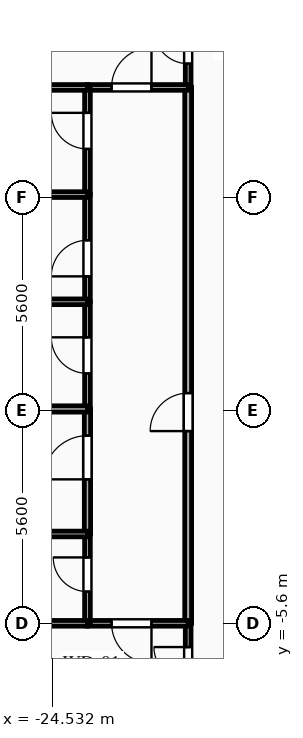
"""IFC4 building model, lengths in metres.
Left out: names, types, materials, properties, quantities, classifications, styles, units other than length and angle.
Written with IfcOpenShell. Run it as: python <this file> out.ifc"""

import sys

from ifc_helpers import new_model, si_unit, direction, frame, frame_2d, origin, place, context, subcontext, project, spatial, rectangle, extrude, element, fill, save


model = new_model("IFC4")
c1 = context("Model", 3, precision=1e-05, world=origin(), true_north=direction((0.0, 1.0)))
c2 = subcontext(c1, "Body", "Model", "MODEL_VIEW")
j1 = project(units=[si_unit("LENGTHUNIT", "METRE"), si_unit("PLANEANGLEUNIT", "RADIAN")], contexts=[c1])
p1 = place(None, origin())
s1 = spatial("IfcSite", under=j1, at=p1, CompositionType="ELEMENT")
p2 = place(p1, origin())
s2 = spatial("IfcBuilding", under=s1, at=p2, CompositionType="ELEMENT")
p3 = place(p2, frame((0.0, 0.0, 137.7)))
s3 = spatial("IfcBuildingStorey", under=s2, at=p3, CompositionType="ELEMENT", Elevation=137.7)
p4 = place(p3, frame((-20.95, 8.5, 0.0), z_axis=(0.0, 0.0, 1.0), x_axis=(0.0, 1.0, 0.0)))
e1 = element("IfcWall", 1, at=p4, inside=s3, PredefinedType="PARTITIONING", context=c2, shape_type="SweptSolid", body=[
    extrude(rectangle(XDim=2.15, YDim=0.15, at=frame_2d((1.075, 0.0))), origin(), (0.0, 0.0, 1.0), 3.04),
])
p5 = place(p4, frame((0.625, 0.0, 0.0)))
e2 = element("IfcOpeningElement", 2, at=p5, cuts=e1, PredefinedType="OPENING", context=c2, shape_type="SweptSolid", body=[
    extrude(rectangle(XDim=0.9, YDim=2.1, at=frame_2d((0.45, 1.05))), frame((0.0, 0.085, 0.0), z_axis=(0.0, -1.0, 0.0), x_axis=(1.0, 0.0, 0.0)), (0.0, 0.0, 1.0), 0.17),
])
p6 = place(p3, frame((-20.95, -7.75, 0.0), z_axis=(0.0, 0.0, 1.0), x_axis=(0.0, 1.0, 0.0)))
e3 = element("IfcWall", 3, at=p6, inside=s3, PredefinedType="PARTITIONING", context=c2, shape_type="SweptSolid", body=[
    extrude(rectangle(XDim=2.15, YDim=0.15, at=frame_2d((1.075, 0.0))), origin(), (0.0, 0.0, 1.0), 3.04),
])
p7 = place(p6, frame((0.625, 0.0, 0.0)))
e4 = element("IfcOpeningElement", 4, at=p7, cuts=e3, PredefinedType="OPENING", context=c2, shape_type="SweptSolid", body=[
    extrude(rectangle(XDim=0.9, YDim=2.1, at=frame_2d((0.45, 1.05))), frame((0.0, 0.085, 0.0), z_axis=(0.0, -1.0, 0.0), x_axis=(1.0, 0.0, 0.0)), (0.0, 0.0, 1.0), 0.17),
])
p8 = place(p3, frame((-20.95, -5.6, 0.0), z_axis=(0.0, 0.0, 1.0), x_axis=(0.0, 1.0, 0.0)))
e5 = element("IfcWall", 5, at=p8, inside=s3, PredefinedType="PARTITIONING", context=c2, shape_type="SweptSolid", body=[
    extrude(rectangle(XDim=14.1, YDim=0.18, at=frame_2d((7.05, 0.0))), origin(), (0.0, 0.0, 1.0), 3.04),
])
p9 = place(p8, frame((5.058, 0.0, 0.0)))
e6 = element("IfcOpeningElement", 6, at=p9, cuts=e5, PredefinedType="OPENING", context=c2, shape_type="SweptSolid", body=[
    extrude(rectangle(XDim=1.0, YDim=2.15, at=frame_2d((0.5, 1.075))), frame((0.0, 0.1, 0.0), z_axis=(0.0, -1.0, 0.0), x_axis=(1.0, 0.0, 0.0)), (0.0, 0.0, 1.0), 0.2),
])
p10 = place(p3, frame((-23.6, 8.5, 0.0), z_axis=(0.0, 0.0, 1.0), x_axis=(1.0, 0.0, 0.0)))
e7 = element("IfcWall", 7, at=p10, inside=s3, PredefinedType="PARTITIONING", context=c2, shape_type="SweptSolid", body=[
    extrude(rectangle(XDim=2.65, YDim=0.15, at=frame_2d((1.325, 0.0))), origin(), (0.0, 0.0, 1.0), 3.04),
])
p11 = place(p10, frame((0.635, 0.0, 0.0)))
e8 = element("IfcOpeningElement", 8, at=p11, cuts=e7, PredefinedType="OPENING", context=c2, shape_type="SweptSolid", body=[
    extrude(rectangle(XDim=1.05, YDim=2.15, at=frame_2d((0.525, 1.075))), frame((0.0, 0.085, 0.0), z_axis=(0.0, -1.0, 0.0), x_axis=(1.0, 0.0, 0.0)), (0.0, 0.0, 1.0), 0.17),
])
p12 = place(p3, frame((-20.95, -5.6, 0.0), z_axis=(0.0, 0.0, 1.0), x_axis=(-1.0, 0.0, 0.0)))
e9 = element("IfcWall", 9, at=p12, inside=s3, PredefinedType="PARTITIONING", context=c2, shape_type="SweptSolid", body=[
    extrude(rectangle(XDim=2.65, YDim=0.15, at=frame_2d((1.325, 0.0))), origin(), (0.0, 0.0, 1.0), 3.04),
])
p13 = place(p12, frame((0.965, 0.0, 0.0)))
e10 = element("IfcOpeningElement", 10, at=p13, cuts=e9, PredefinedType="OPENING", context=c2, shape_type="SweptSolid", body=[
    extrude(rectangle(XDim=1.05, YDim=2.15, at=frame_2d((0.525, 1.075))), frame((0.0, 0.085, 0.0), z_axis=(0.0, -1.0, 0.0), x_axis=(1.0, 0.0, 0.0)), (0.0, 0.0, 1.0), 0.17),
])
p14 = place(p3, frame((-23.6, -5.6, 0.0), z_axis=(0.0, 0.0, 1.0), x_axis=(0.0, 1.0, 0.0)))
e11 = element("IfcWall", 11, at=p14, inside=s3, PredefinedType="PLUMBINGWALL", context=c2, shape_type="SweptSolid", body=[
    extrude(rectangle(XDim=2.35, YDim=0.15, at=frame_2d((1.175, 0.0))), origin(), (0.0, 0.0, 1.0), 2.695),
])
p15 = place(p14, frame((0.834, 0.0, 0.0)))
e12 = element("IfcOpeningElement", 12, at=p15, cuts=e11, PredefinedType="OPENING", context=c2, shape_type="SweptSolid", body=[
    extrude(rectangle(XDim=0.9, YDim=2.1, at=frame_2d((0.45, 1.05))), frame((0.0, 0.085, 0.0), z_axis=(0.0, -1.0, 0.0), x_axis=(1.0, 0.0, 0.0)), (0.0, 0.0, 1.0), 0.17),
])
p16 = place(p3, frame((-23.6, -3.25, 0.0), z_axis=(0.0, 0.0, 1.0), x_axis=(0.0, 1.0, 0.0)))
e13 = element("IfcWall", 13, at=p16, inside=s3, PredefinedType="PARTITIONING", context=c2, shape_type="SweptSolid", body=[
    extrude(rectangle(XDim=3.29, YDim=0.165, at=frame_2d((1.645, 0.0))), origin(), (0.0, 0.0, 1.0), 2.695),
])
p17 = place(p16, frame((1.438, 0.0, 0.0)))
e14 = element("IfcOpeningElement", 14, at=p17, cuts=e13, PredefinedType="OPENING", context=c2, shape_type="SweptSolid", body=[
    extrude(rectangle(XDim=1.15, YDim=2.15, at=frame_2d((0.575, 1.075))), frame((0.0, 0.093, 0.0), z_axis=(0.0, -1.0, 0.0), x_axis=(1.0, 0.0, 0.0)), (0.0, 0.0, 1.0), 0.185),
])
p18 = place(p3, frame((-23.6, 0.04, 0.0), z_axis=(0.0, 0.0, 1.0), x_axis=(0.0, 1.0, 0.0)))
e15 = element("IfcWall", 15, at=p18, inside=s3, PredefinedType="PARTITIONING", context=c2, shape_type="SweptSolid", body=[
    extrude(rectangle(XDim=2.82, YDim=0.15, at=frame_2d((1.41, 0.0))), origin(), (0.0, 0.0, 1.0), 2.695),
])
p19 = place(p18, frame((0.935, 0.0, 0.0)))
e16 = element("IfcOpeningElement", 16, at=p19, cuts=e15, PredefinedType="OPENING", context=c2, shape_type="SweptSolid", body=[
    extrude(rectangle(XDim=0.95, YDim=2.1, at=frame_2d((0.475, 1.05))), frame((0.0, 0.085, 0.0), z_axis=(0.0, -1.0, 0.0), x_axis=(1.0, 0.0, 0.0)), (0.0, 0.0, 1.0), 0.17),
])
p20 = place(p3, frame((-23.6, 2.86, 0.0), z_axis=(0.0, 0.0, 1.0), x_axis=(0.0, 1.0, 0.0)))
e17 = element("IfcWall", 17, at=p20, inside=s3, PredefinedType="PARTITIONING", context=c2, shape_type="SweptSolid", body=[
    extrude(rectangle(XDim=2.82, YDim=0.15, at=frame_2d((1.41, 0.0))), origin(), (0.0, 0.0, 1.0), 2.695),
])
p21 = place(p20, frame((0.669, 0.0, 0.0)))
e18 = element("IfcOpeningElement", 18, at=p21, cuts=e17, PredefinedType="OPENING", context=c2, shape_type="SweptSolid", body=[
    extrude(rectangle(XDim=0.95, YDim=2.1, at=frame_2d((0.475, 1.05))), frame((0.0, 0.085, 0.0), z_axis=(0.0, -1.0, 0.0), x_axis=(1.0, 0.0, 0.0)), (0.0, 0.0, 1.0), 0.17),
])
p22 = place(p3, frame((-23.6, 5.68, 0.0), z_axis=(0.0, 0.0, 1.0), x_axis=(0.0, 1.0, 0.0)))
e19 = element("IfcWall", 19, at=p22, inside=s3, PredefinedType="PARTITIONING", context=c2, shape_type="SweptSolid", body=[
    extrude(rectangle(XDim=2.82, YDim=0.15, at=frame_2d((1.41, 0.0))), origin(), (0.0, 0.0, 1.0), 2.695),
])
p23 = place(p22, frame((1.201, 0.0, 0.0)))
e20 = element("IfcOpeningElement", 20, at=p23, cuts=e19, PredefinedType="OPENING", context=c2, shape_type="SweptSolid", body=[
    extrude(rectangle(XDim=0.95, YDim=2.1, at=frame_2d((0.475, 1.05))), frame((0.0, 0.085, 0.0), z_axis=(0.0, -1.0, 0.0), x_axis=(1.0, 0.0, 0.0)), (0.0, 0.0, 1.0), 0.17),
])
p24 = place(p3, frame((-23.6, 8.5, 0.0), z_axis=(0.0, 0.0, 1.0), x_axis=(-1.0, 0.0, 0.0)))
e21 = element("IfcWall", 21, at=p24, inside=s3, PredefinedType="PARTITIONING", context=c2, shape_type="SweptSolid", body=[
    extrude(rectangle(XDim=1.165, YDim=0.15, at=frame_2d((0.583, 0.0))), origin(), (0.0, 0.0, 1.0), 3.04),
])
for number, where, z_axis, x_axis in (
    (22, (-29.0, -5.6, 0.0), (0.0, 0.0, 1.0), (1.0, 0.0, 0.0)),
    (23, (-29.0, -3.25, 0.0), (0.0, 0.0, 1.0), (1.0, 0.0, 0.0)),
):
    element("IfcWall", number, at=place(p3, frame(where, z_axis=z_axis, x_axis=x_axis)), inside=s3, PredefinedType="PLUMBINGWALL", context=c2, shape_type="SweptSolid", body=[
        extrude(rectangle(XDim=5.4, YDim=0.15, at=frame_2d((2.7, 0.0))), origin(), (0.0, 0.0, 1.0), 3.04),
    ])
p25 = place(p3, frame((-29.0, 0.04, 0.0), z_axis=(0.0, 0.0, 1.0), x_axis=(1.0, 0.0, 0.0)))
e24 = element("IfcWall", 24, at=p25, inside=s3, PredefinedType="PARTITIONING", context=c2, shape_type="SweptSolid", body=[
    extrude(rectangle(XDim=5.4, YDim=0.165, at=frame_2d((2.7, 0.0))), origin(), (0.0, 0.0, 1.0), 3.04),
])
for number, where, z_axis, x_axis in (
    (25, (-29.0, 2.86, 0.0), (0.0, 0.0, 1.0), (1.0, 0.0, 0.0)),
    (26, (-29.0, 5.68, 0.0), (0.0, 0.0, 1.0), (1.0, 0.0, 0.0)),
):
    element("IfcWall", number, at=place(p3, frame(where, z_axis=z_axis, x_axis=x_axis)), inside=s3, PredefinedType="PARTITIONING", context=c2, shape_type="SweptSolid", body=[
        extrude(rectangle(XDim=5.4, YDim=0.15, at=frame_2d((2.7, 0.0))), origin(), (0.0, 0.0, 1.0), 3.04),
    ])
p26 = place(p5, origin())
e27 = element("IfcDoor", 27, at=p26, inside=s3, OperationType="SINGLE_SWING_RIGHT", PredefinedType="DOOR", context=c2, shape_type="SweptSolid", body=[
    extrude(rectangle(XDim=0.9, YDim=2.1, at=frame_2d((0.45, 1.05))), frame((0.0, 0.025, 0.0), z_axis=(0.0, -1.0, 0.0), x_axis=(1.0, 0.0, 0.0)), (0.0, 0.0, 1.0), 0.05),
])
fill(e2, e27)
p27 = place(p7, origin())
e28 = element("IfcDoor", 28, at=p27, inside=s3, OperationType="SINGLE_SWING_RIGHT", PredefinedType="DOOR", context=c2, shape_type="SweptSolid", body=[
    extrude(rectangle(XDim=0.9, YDim=2.1, at=frame_2d((0.45, 1.05))), frame((0.0, 0.025, 0.0), z_axis=(0.0, -1.0, 0.0), x_axis=(1.0, 0.0, 0.0)), (0.0, 0.0, 1.0), 0.05),
])
fill(e4, e28)
p28 = place(p9, origin())
e29 = element("IfcDoor", 29, at=p28, inside=s3, OperationType="SINGLE_SWING_LEFT", PredefinedType="DOOR", context=c2, shape_type="SweptSolid", body=[
    extrude(rectangle(XDim=1.0, YDim=2.15, at=frame_2d((0.5, 1.075))), frame((0.0, 0.025, 0.0), z_axis=(0.0, -1.0, 0.0), x_axis=(1.0, 0.0, 0.0)), (0.0, 0.0, 1.0), 0.05),
])
fill(e6, e29)
p29 = place(p11, origin())
e30 = element("IfcDoor", 30, at=p29, inside=s3, OperationType="SINGLE_SWING_RIGHT", PredefinedType="DOOR", context=c2, shape_type="SweptSolid", body=[
    extrude(rectangle(XDim=1.05, YDim=2.15, at=frame_2d((0.525, 1.075))), frame((0.0, 0.025, 0.0), z_axis=(0.0, -1.0, 0.0), x_axis=(1.0, 0.0, 0.0)), (0.0, 0.0, 1.0), 0.05),
])
fill(e8, e30)
p30 = place(p13, origin())
e31 = element("IfcDoor", 31, at=p30, inside=s3, OperationType="SINGLE_SWING_LEFT", PredefinedType="DOOR", context=c2, shape_type="SweptSolid", body=[
    extrude(rectangle(XDim=1.05, YDim=2.15, at=frame_2d((0.525, 1.075))), frame((0.0, 0.025, 0.0), z_axis=(0.0, -1.0, 0.0), x_axis=(1.0, 0.0, 0.0)), (0.0, 0.0, 1.0), 0.05),
])
fill(e10, e31)
p31 = place(p15, origin())
e32 = element("IfcDoor", 32, at=p31, inside=s3, OperationType="SINGLE_SWING_RIGHT", PredefinedType="DOOR", context=c2, shape_type="SweptSolid", body=[
    extrude(rectangle(XDim=0.9, YDim=2.1, at=frame_2d((0.45, 1.05))), frame((0.0, 0.025, 0.0), z_axis=(0.0, -1.0, 0.0), x_axis=(1.0, 0.0, 0.0)), (0.0, 0.0, 1.0), 0.05),
])
fill(e12, e32)
p32 = place(p17, origin())
e33 = element("IfcDoor", 33, at=p32, inside=s3, OperationType="SINGLE_SWING_LEFT", PredefinedType="DOOR", context=c2, shape_type="SweptSolid", body=[
    extrude(rectangle(XDim=1.15, YDim=2.15, at=frame_2d((0.575, 1.075))), frame((0.0, 0.025, 0.0), z_axis=(0.0, -1.0, 0.0), x_axis=(1.0, 0.0, 0.0)), (0.0, 0.0, 1.0), 0.05),
])
fill(e14, e33)
p33 = place(p19, origin())
e34 = element("IfcDoor", 34, at=p33, inside=s3, OperationType="SINGLE_SWING_RIGHT", PredefinedType="DOOR", context=c2, shape_type="SweptSolid", body=[
    extrude(rectangle(XDim=0.95, YDim=2.1, at=frame_2d((0.475, 1.05))), frame((0.0, 0.025, 0.0), z_axis=(0.0, -1.0, 0.0), x_axis=(1.0, 0.0, 0.0)), (0.0, 0.0, 1.0), 0.05),
])
fill(e16, e34)
p34 = place(p21, origin())
e35 = element("IfcDoor", 35, at=p34, inside=s3, OperationType="SINGLE_SWING_LEFT", PredefinedType="DOOR", context=c2, shape_type="SweptSolid", body=[
    extrude(rectangle(XDim=0.95, YDim=2.1, at=frame_2d((0.475, 1.05))), frame((0.0, 0.025, 0.0), z_axis=(0.0, -1.0, 0.0), x_axis=(1.0, 0.0, 0.0)), (0.0, 0.0, 1.0), 0.05),
])
fill(e18, e35)
p35 = place(p23, origin())
e36 = element("IfcDoor", 36, at=p35, inside=s3, OperationType="SINGLE_SWING_RIGHT", PredefinedType="DOOR", context=c2, shape_type="SweptSolid", body=[
    extrude(rectangle(XDim=0.95, YDim=2.1, at=frame_2d((0.475, 1.05))), frame((0.0, 0.025, 0.0), z_axis=(0.0, -1.0, 0.0), x_axis=(1.0, 0.0, 0.0)), (0.0, 0.0, 1.0), 0.05),
])
fill(e20, e36)
save(model, sys.argv[1])
